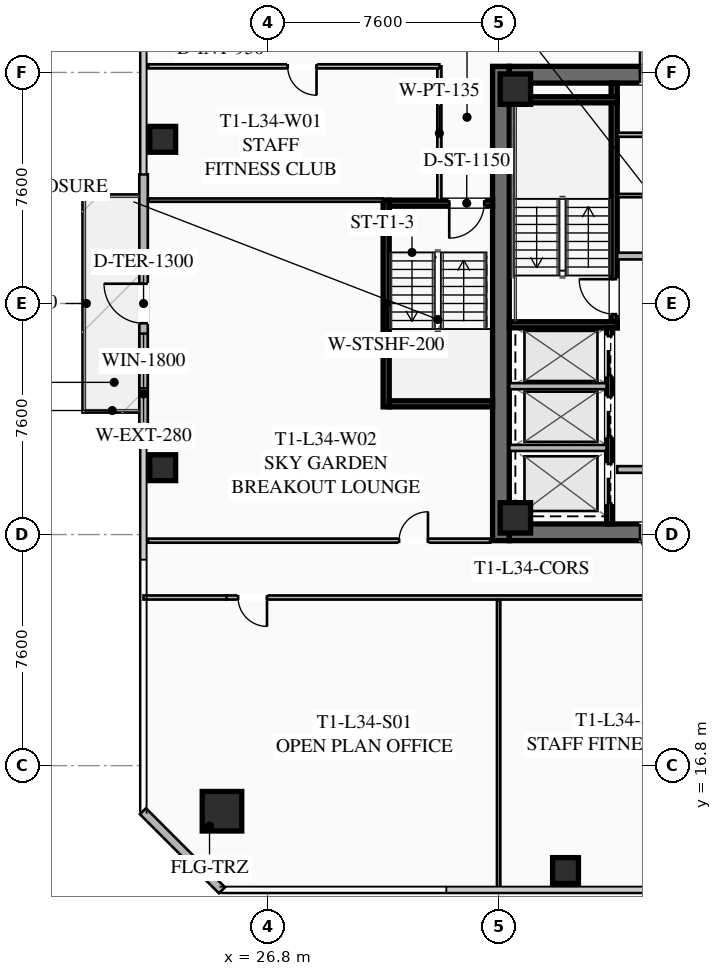
"""IFC4 building model, lengths in metres.
Left out: names, types, materials, properties, quantities, classifications, styles, units other than length and angle.
Written with IfcOpenShell. Run it as: python <this file> out.ifc"""

import sys

from ifc_helpers import new_model, si_unit, direction, frame, frame_2d, origin, origin_2d, place, context, subcontext, project, spatial, rectangle, hollow_rectangle, extrude, element, fill, save


model = new_model("IFC4")
c1 = context("Model", 3, precision=1e-05, world=origin(), true_north=direction((0.0, 1.0)))
c2 = subcontext(c1, "Body", "Model", "MODEL_VIEW")
j1 = project(units=[si_unit("LENGTHUNIT", "METRE"), si_unit("PLANEANGLEUNIT", "RADIAN")], contexts=[c1])
p1 = place(None, origin())
s1 = spatial("IfcSite", under=j1, at=p1, CompositionType="ELEMENT")
p2 = place(p1, origin())
s2 = spatial("IfcBuilding", under=s1, at=p2, CompositionType="ELEMENT")
p3 = place(p2, frame((0.0, 0.0, 128.6)))
s3 = spatial("IfcBuildingStorey", under=s2, at=p3, CompositionType="ELEMENT", Elevation=128.6)
p4 = place(p3, frame((34.475, 24.2, 0.0), z_axis=(0.0, 0.0, 1.0), x_axis=(0.0, 1.0, 0.0)))
e1 = element("IfcWall", 1, at=p4, inside=s3, PredefinedType="SHEAR", context=c2, shape_type="SweptSolid", body=[
    extrude(rectangle(XDim=15.6, YDim=0.55, at=frame_2d((7.8, 0.0))), origin(), (0.0, 0.0, 1.0), 3.55),
])
p5 = place(p3, frame((49.25, 24.475, 0.0), z_axis=(0.0, 0.0, 1.0), x_axis=(-1.0, 0.0, 0.0)))
e2 = element("IfcWall", 2, at=p5, inside=s3, PredefinedType="SHEAR", context=c2, shape_type="SweptSolid", body=[
    extrude(rectangle(XDim=14.5, YDim=0.55, at=frame_2d((7.25, 0.0))), origin(), (0.0, 0.0, 1.0), 3.55),
])
p6 = place(p5, frame((8.95, 0.0, 0.0)))
e3 = element("IfcOpeningElement", 3, at=p6, cuts=e2, PredefinedType="OPENING", context=c2, shape_type="SweptSolid", body=[
    extrude(rectangle(XDim=1.25, YDim=2.25, at=frame_2d((0.625, 1.125))), frame((0.0, 0.285, 0.0), z_axis=(0.0, -1.0, 0.0), x_axis=(1.0, 0.0, 0.0)), (0.0, 0.0, 1.0), 0.57),
])
p7 = place(p5, frame((3.9, 0.0, 0.0)))
e4 = element("IfcOpeningElement", 4, at=p7, cuts=e2, PredefinedType="OPENING", context=c2, shape_type="SweptSolid", body=[
    extrude(rectangle(XDim=1.25, YDim=2.25, at=frame_2d((0.625, 1.125))), frame((0.0, 0.285, 0.0), z_axis=(0.0, -1.0, 0.0), x_axis=(1.0, 0.0, 0.0)), (0.0, 0.0, 1.0), 0.57),
])
p8 = place(p3, frame((34.75, 39.525, 0.0), z_axis=(0.0, 0.0, 1.0), x_axis=(1.0, 0.0, 0.0)))
e5 = element("IfcWall", 5, at=p8, inside=s3, PredefinedType="SHEAR", context=c2, shape_type="SweptSolid", body=[
    extrude(rectangle(XDim=14.5, YDim=0.55, at=frame_2d((7.25, 0.0))), origin(), (0.0, 0.0, 1.0), 3.55),
])
p9 = place(p8, frame((4.3, 0.0, 0.0)))
e6 = element("IfcOpeningElement", 6, at=p9, cuts=e5, PredefinedType="OPENING", context=c2, shape_type="SweptSolid", body=[
    extrude(rectangle(XDim=1.25, YDim=2.25, at=frame_2d((0.625, 1.125))), frame((0.0, 0.285, 0.0), z_axis=(0.0, -1.0, 0.0), x_axis=(1.0, 0.0, 0.0)), (0.0, 0.0, 1.0), 0.57),
])
p10 = place(p8, frame((9.35, 0.0, 0.0)))
e7 = element("IfcOpeningElement", 7, at=p10, cuts=e5, PredefinedType="OPENING", context=c2, shape_type="SweptSolid", body=[
    extrude(rectangle(XDim=1.25, YDim=2.25, at=frame_2d((0.625, 1.125))), frame((0.0, 0.285, 0.0), z_axis=(0.0, -1.0, 0.0), x_axis=(1.0, 0.0, 0.0)), (0.0, 0.0, 1.0), 0.57),
])
for number, where, z_axis, x_axis in (
    (8, (34.95, 24.95, 0.0), (0.0, 0.0, 1.0), (1.0, 0.0, 0.0)),
    (9, (34.95, 39.05, 0.0), (0.0, 0.0, 1.0), (1.0, 0.0, 0.0)),
):
    element("IfcColumn", number, at=place(p3, frame(where, z_axis=z_axis, x_axis=x_axis)), inside=s3, PredefinedType="COLUMN", context=c2, shape_type="SweptSolid", body=[
        extrude(hollow_rectangle(XDim=1.0, YDim=1.0, WallThickness=0.04, at=origin_2d()), origin(), (0.0, 0.0, 1.0), 3.37),
    ])
p11 = place(p3, frame((25.3, 15.3, 0.0), z_axis=(0.0, 0.0, 1.0), x_axis=(1.0, 0.0, 0.0)))
e10 = element("IfcColumn", 10, at=p11, inside=s3, PredefinedType="COLUMN", context=c2, shape_type="SweptSolid", body=[
    extrude(hollow_rectangle(XDim=1.3, YDim=1.3, WallThickness=0.05, at=origin_2d()), origin(), (0.0, 0.0, 1.0), 3.37),
])
for number, where, z_axis, x_axis in (
    (11, (36.6, 13.35, 0.0), (0.0, 0.0, 1.0), (1.0, 0.0, 0.0)),
    (12, (23.35, 37.4, 0.0), (0.0, 0.0, 1.0), (1.0, 0.0, 0.0)),
    (13, (23.35, 26.6, 0.0), (0.0, 0.0, 1.0), (1.0, 0.0, 0.0)),
):
    element("IfcColumn", number, at=place(p3, frame(where, z_axis=z_axis, x_axis=x_axis)), inside=s3, PredefinedType="COLUMN", context=c2, shape_type="SweptSolid", body=[
        extrude(hollow_rectangle(XDim=0.85, YDim=0.85, WallThickness=0.035, at=origin_2d()), origin(), (0.0, 0.0, 1.0), 3.37),
    ])
p12 = place(p3, frame((22.72, 27.75, 0.0), z_axis=(0.0, 0.0, 1.0), x_axis=(0.0, 1.0, 0.0)))
e14 = element("IfcWall", 14, at=p12, inside=s3, PredefinedType="SOLIDWALL", context=c2, shape_type="SweptSolid", body=[
    extrude(rectangle(XDim=8.5, YDim=0.28, at=frame_2d((4.25, 0.0))), origin(), (0.0, 0.0, 1.0), 3.37),
])
p13 = place(p12, frame((3.6, 0.0, 0.0)))
e15 = element("IfcOpeningElement", 15, at=p13, cuts=e14, PredefinedType="OPENING", context=c2, shape_type="SweptSolid", body=[
    extrude(rectangle(XDim=1.3, YDim=2.15, at=frame_2d((0.65, 1.075))), frame((0.0, 0.15, 0.0), z_axis=(0.0, -1.0, 0.0), x_axis=(1.0, 0.0, 0.0)), (0.0, 0.0, 1.0), 0.3),
])
p14 = place(p12, frame((1.46, 0.0, 0.85)))
e16 = element("IfcOpeningElement", 16, at=p14, cuts=e14, PredefinedType="OPENING", context=c2, shape_type="SweptSolid", body=[
    extrude(rectangle(XDim=1.8, YDim=1.92, at=frame_2d((0.9, 0.96))), frame((0.0, 0.15, 0.0), z_axis=(0.0, -1.0, 0.0), x_axis=(1.0, 0.0, 0.0)), (0.0, 0.0, 1.0), 0.3),
])
p15 = place(p3, frame((25.3, 12.7, 0.0), z_axis=(0.0, 0.0, 1.0), x_axis=(-0.707106781187, 0.707106781187, 0.0)))
e17 = element("IfcWall", 17, at=p15, inside=s3, PredefinedType="SOLIDWALL", context=c2, shape_type="SweptSolid", body=[
    extrude(rectangle(XDim=3.677, YDim=0.28, at=frame_2d((1.838, 0.0))), origin(), (0.0, 0.0, 1.0), 3.37),
])
p16 = place(p3, frame((38.2, 31.2, 0.0), z_axis=(0.0, 0.0, 1.0), x_axis=(0.0, 1.0, 0.0)))
e18 = element("IfcWall", 18, at=p16, inside=s3, PredefinedType="SHEAR", context=c2, shape_type="SweptSolid", body=[
    extrude(rectangle(XDim=8.05, YDim=0.2, at=frame_2d((4.025, 0.0))), origin(), (0.0, 0.0, 1.0), 3.37),
])
p17 = place(p16, frame((0.45, 0.0, 0.0)))
e19 = element("IfcOpeningElement", 19, at=p17, cuts=e18, PredefinedType="OPENING", context=c2, shape_type="SweptSolid", body=[
    extrude(rectangle(XDim=1.15, YDim=2.2, at=frame_2d((0.575, 1.1))), frame((0.0, 0.11, 0.0), z_axis=(0.0, -1.0, 0.0), x_axis=(1.0, 0.0, 0.0)), (0.0, 0.0, 1.0), 0.22),
])
for number, where, z_axis, x_axis in (
    (20, (34.75, 31.3, 0.0), (0.0, 0.0, 1.0), (1.0, 0.0, 0.0)),
    (21, (34.75, 38.7, 0.0), (0.0, 0.0, 1.0), (1.0, 0.0, 0.0)),
):
    element("IfcWall", number, at=place(p3, frame(where, z_axis=z_axis, x_axis=x_axis)), inside=s3, PredefinedType="SHEAR", context=c2, shape_type="SweptSolid", body=[
        extrude(rectangle(XDim=3.55, YDim=0.2, at=frame_2d((1.775, 0.0))), origin(), (0.0, 0.0, 1.0), 3.37),
    ])
p18 = place(p3, frame((38.3, 33.56, 0.0), z_axis=(0.0, 0.0, 1.0), x_axis=(1.0, 0.0, 0.0)))
e22 = element("IfcWall", 22, at=p18, inside=s3, PredefinedType="SOLIDWALL", context=c2, shape_type="SweptSolid", body=[
    extrude(rectangle(XDim=3.15, YDim=0.22, at=frame_2d((1.575, 0.0))), origin(), (0.0, 0.0, 1.0), 2.723),
])
p19 = place(p18, frame((1.1, 0.0, 0.0)))
e23 = element("IfcOpeningElement", 23, at=p19, cuts=e22, PredefinedType="OPENING", context=c2, shape_type="SweptSolid", body=[
    extrude(rectangle(XDim=0.95, YDim=2.05, at=frame_2d((0.475, 1.025))), frame((0.0, 0.12, 0.0), z_axis=(0.0, -1.0, 0.0), x_axis=(1.0, 0.0, 0.0)), (0.0, 0.0, 1.0), 0.24),
])
p20 = place(p3, frame((38.3, 26.54, 0.0), z_axis=(0.0, 0.0, 1.0), x_axis=(1.0, 0.0, 0.0)))
e24 = element("IfcWall", 24, at=p20, inside=s3, PredefinedType="SOLIDWALL", context=c2, shape_type="SweptSolid", body=[
    extrude(rectangle(XDim=3.15, YDim=0.22, at=frame_2d((1.575, 0.0))), origin(), (0.0, 0.0, 1.0), 2.723),
])
p21 = place(p20, frame((0.95, 0.0, 0.0)))
e25 = element("IfcOpeningElement", 25, at=p21, cuts=e24, PredefinedType="OPENING", context=c2, shape_type="SweptSolid", body=[
    extrude(rectangle(XDim=1.25, YDim=2.25, at=frame_2d((0.625, 1.125))), frame((0.0, 0.12, 0.0), z_axis=(0.0, -1.0, 0.0), x_axis=(1.0, 0.0, 0.0)), (0.0, 0.0, 1.0), 0.24),
])
p22 = place(p3, frame((38.05, 24.75, 0.0), z_axis=(0.0, 0.0, 1.0), x_axis=(0.0, 1.0, 0.0)))
e26 = element("IfcWall", 26, at=p22, inside=s3, PredefinedType="SHEAR", context=c2, shape_type="SweptSolid", body=[
    extrude(rectangle(XDim=6.45, YDim=0.2, at=frame_2d((3.225, 0.0))), origin(), (0.0, 0.0, 1.0), 3.37),
])
p23 = place(p22, frame((4.875, 0.0, 0.0)))
e27 = element("IfcOpeningElement", 27, at=p23, cuts=e26, PredefinedType="OPENING", context=c2, shape_type="SweptSolid", body=[
    extrude(rectangle(XDim=1.3, YDim=2.25, at=frame_2d((0.65, 1.125))), frame((0.0, 0.11, 0.0), z_axis=(0.0, -1.0, 0.0), x_axis=(1.0, 0.0, 0.0)), (0.0, 0.0, 1.0), 0.22),
])
p24 = place(p22, frame((2.875, 0.0, 0.0)))
e28 = element("IfcOpeningElement", 28, at=p24, cuts=e26, PredefinedType="OPENING", context=c2, shape_type="SweptSolid", body=[
    extrude(rectangle(XDim=1.3, YDim=2.25, at=frame_2d((0.65, 1.125))), frame((0.0, 0.11, 0.0), z_axis=(0.0, -1.0, 0.0), x_axis=(1.0, 0.0, 0.0)), (0.0, 0.0, 1.0), 0.22),
])
p25 = place(p22, frame((0.675, 0.0, 0.0)))
e29 = element("IfcOpeningElement", 29, at=p25, cuts=e26, PredefinedType="OPENING", context=c2, shape_type="SweptSolid", body=[
    extrude(rectangle(XDim=1.3, YDim=2.25, at=frame_2d((0.65, 1.125))), frame((0.0, 0.11, 0.0), z_axis=(0.0, -1.0, 0.0), x_axis=(1.0, 0.0, 0.0)), (0.0, 0.0, 1.0), 0.22),
])
for number, where, z_axis, x_axis in (
    (30, (34.75, 27.25, 0.0), (0.0, 0.0, 1.0), (1.0, 0.0, 0.0)),
    (31, (34.75, 29.28, 0.0), (0.0, 0.0, 1.0), (1.0, 0.0, 0.0)),
):
    element("IfcWall", number, at=place(p3, frame(where, z_axis=z_axis, x_axis=x_axis)), inside=s3, PredefinedType="SOLIDWALL", context=c2, shape_type="SweptSolid", body=[
        extrude(rectangle(XDim=3.2, YDim=0.2, at=frame_2d((1.6, 0.0))), origin(), (0.0, 0.0, 1.0), 3.37),
    ])
p26 = place(p3, frame((38.3, 37.55, 0.0), z_axis=(0.0, 0.0, 1.0), x_axis=(1.0, 0.0, 0.0)))
e32 = element("IfcWall", 32, at=p26, inside=s3, PredefinedType="PARTITIONING", context=c2, shape_type="SweptSolid", body=[
    extrude(rectangle(XDim=3.15, YDim=0.135, at=frame_2d((1.575, 0.0))), origin(), (0.0, 0.0, 1.0), 2.723),
])
p27 = place(p26, frame((1.05, 0.0, 0.0)))
e33 = element("IfcOpeningElement", 33, at=p27, cuts=e32, PredefinedType="OPENING", context=c2, shape_type="SweptSolid", body=[
    extrude(rectangle(XDim=1.05, YDim=2.2, at=frame_2d((0.525, 1.1))), frame((0.0, 0.077, 0.0), z_axis=(0.0, -1.0, 0.0), x_axis=(1.0, 0.0, 0.0)), (0.0, 0.0, 1.0), 0.155),
])
p28 = place(p3, frame((38.3, 35.55, 0.0), z_axis=(0.0, 0.0, 1.0), x_axis=(1.0, 0.0, 0.0)))
e34 = element("IfcWall", 34, at=p28, inside=s3, PredefinedType="PARTITIONING", context=c2, shape_type="SweptSolid", body=[
    extrude(rectangle(XDim=3.15, YDim=0.11, at=frame_2d((1.575, 0.0))), origin(), (0.0, 0.0, 1.0), 2.723),
])
p29 = place(p3, frame((30.7, 28.6, 0.0), z_axis=(0.0, 0.0, 1.0), x_axis=(0.0, 1.0, 0.0)))
e35 = element("IfcWall", 35, at=p29, inside=s3, PredefinedType="SHEAR", context=c2, shape_type="SweptSolid", body=[
    extrude(rectangle(XDim=6.8, YDim=0.2, at=frame_2d((3.4, 0.0))), origin(), (0.0, 0.0, 1.0), 3.37),
])
p30 = place(p3, frame((34.2, 35.3, 0.0), z_axis=(0.0, 0.0, 1.0), x_axis=(-1.0, 0.0, 0.0)))
e36 = element("IfcWall", 36, at=p30, inside=s3, PredefinedType="SHEAR", context=c2, shape_type="SweptSolid", body=[
    extrude(rectangle(XDim=3.4, YDim=0.2, at=frame_2d((1.7, 0.0))), origin(), (0.0, 0.0, 1.0), 3.37),
])
p31 = place(p30, frame((0.275, 0.0, 0.0)))
e37 = element("IfcOpeningElement", 37, at=p31, cuts=e36, PredefinedType="OPENING", context=c2, shape_type="SweptSolid", body=[
    extrude(rectangle(XDim=1.15, YDim=2.2, at=frame_2d((0.575, 1.1))), frame((0.0, 0.11, 0.0), z_axis=(0.0, -1.0, 0.0), x_axis=(1.0, 0.0, 0.0)), (0.0, 0.0, 1.0), 0.22),
])
p32 = place(p3, frame((30.8, 28.7, 0.0), z_axis=(0.0, 0.0, 1.0), x_axis=(1.0, 0.0, 0.0)))
e38 = element("IfcWall", 38, at=p32, inside=s3, PredefinedType="SHEAR", context=c2, shape_type="SweptSolid", body=[
    extrude(rectangle(XDim=3.4, YDim=0.2, at=frame_2d((1.7, 0.0))), origin(), (0.0, 0.0, 1.0), 3.37),
])
p33 = place(p3, frame((32.45, 35.4, 0.0), z_axis=(0.0, 0.0, 1.0), x_axis=(0.0, 1.0, 0.0)))
e39 = element("IfcWall", 39, at=p33, inside=s3, PredefinedType="PARTITIONING", context=c2, shape_type="SweptSolid", body=[
    extrude(rectangle(XDim=4.4, YDim=0.135, at=frame_2d((2.2, 0.0))), origin(), (0.0, 0.0, 1.0), 2.723),
])
p34 = place(p3, frame((58.55, 22.33, 0.0), z_axis=(0.0, 0.0, 1.0), x_axis=(-1.0, 0.0, 0.0)))
e40 = element("IfcWall", 40, at=p34, inside=s3, PredefinedType="PARTITIONING", context=c2, shape_type="SweptSolid", body=[
    extrude(rectangle(XDim=33.1, YDim=0.135, at=frame_2d((16.55, 0.0))), origin(), (0.0, 0.0, 1.0), 2.723),
])
p35 = place(p34, frame((31.77, 0.0, 0.0)))
e41 = element("IfcOpeningElement", 41, at=p35, cuts=e40, PredefinedType="OPENING", context=c2, shape_type="SweptSolid", body=[
    extrude(rectangle(XDim=0.95, YDim=2.05, at=frame_2d((0.475, 1.025))), frame((0.0, 0.077, 0.0), z_axis=(0.0, -1.0, 0.0), x_axis=(1.0, 0.0, 0.0)), (0.0, 0.0, 1.0), 0.155),
])
p36 = place(p34, frame((16.33, 0.0, 0.0)))
e42 = element("IfcOpeningElement", 42, at=p36, cuts=e40, PredefinedType="OPENING", context=c2, shape_type="SweptSolid", body=[
    extrude(rectangle(XDim=0.95, YDim=2.05, at=frame_2d((0.475, 1.025))), frame((0.0, 0.077, 0.0), z_axis=(0.0, -1.0, 0.0), x_axis=(1.0, 0.0, 0.0)), (0.0, 0.0, 1.0), 0.155),
])
p37 = place(p34, frame((12.046, 0.0, 0.0)))
e43 = element("IfcOpeningElement", 43, at=p37, cuts=e40, PredefinedType="OPENING", context=c2, shape_type="SweptSolid", body=[
    extrude(rectangle(XDim=0.95, YDim=2.05, at=frame_2d((0.475, 1.025))), frame((0.0, 0.077, 0.0), z_axis=(0.0, -1.0, 0.0), x_axis=(1.0, 0.0, 0.0)), (0.0, 0.0, 1.0), 0.155),
])
p38 = place(p34, frame((0.38, 0.0, 0.0)))
e44 = element("IfcOpeningElement", 44, at=p38, cuts=e40, PredefinedType="OPENING", context=c2, shape_type="SweptSolid", body=[
    extrude(rectangle(XDim=0.95, YDim=2.05, at=frame_2d((0.475, 1.025))), frame((0.0, 0.077, 0.0), z_axis=(0.0, -1.0, 0.0), x_axis=(1.0, 0.0, 0.0)), (0.0, 0.0, 1.0), 0.155),
])
p39 = place(p3, frame((22.72, 22.33, 0.0), z_axis=(0.0, 0.0, 1.0), x_axis=(1.0, 0.0, 0.0)))
e45 = element("IfcWall", 45, at=p39, inside=s3, PredefinedType="PARTITIONING", context=c2, shape_type="SweptSolid", body=[
    extrude(rectangle(XDim=2.73, YDim=0.135, at=frame_2d((1.365, 0.0))), origin(), (0.0, 0.0, 1.0), 2.723),
])
p40 = place(p3, frame((34.4, 12.72, 0.0), z_axis=(0.0, 0.0, 1.0), x_axis=(0.0, 1.0, 0.0)))
e46 = element("IfcWall", 46, at=p40, inside=s3, PredefinedType="PARTITIONING", context=c2, shape_type="SweptSolid", body=[
    extrude(rectangle(XDim=9.53, YDim=0.11, at=frame_2d((4.765, 0.0))), origin(), (0.0, 0.0, 1.0), 2.723),
])
p41 = place(p3, frame((32.45, 39.8, 0.0), z_axis=(0.0, 0.0, 1.0), x_axis=(-1.0, 0.0, 0.0)))
e47 = element("IfcWall", 47, at=p41, inside=s3, PredefinedType="PARTITIONING", context=c2, shape_type="SweptSolid", body=[
    extrude(rectangle(XDim=9.58, YDim=0.135, at=frame_2d((4.79, 0.0))), origin(), (0.0, 0.0, 1.0), 2.723),
])
p42 = place(p41, frame((4.04, 0.0, 0.0)))
e48 = element("IfcOpeningElement", 48, at=p42, cuts=e47, PredefinedType="OPENING", context=c2, shape_type="SweptSolid", body=[
    extrude(rectangle(XDim=0.95, YDim=2.05, at=frame_2d((0.475, 1.025))), frame((0.0, 0.077, 0.0), z_axis=(0.0, -1.0, 0.0), x_axis=(1.0, 0.0, 0.0)), (0.0, 0.0, 1.0), 0.155),
])
p43 = place(p3, frame((22.87, 24.2, 0.0), z_axis=(0.0, 0.0, 1.0), x_axis=(1.0, 0.0, 0.0)))
e49 = element("IfcWall", 49, at=p43, inside=s3, PredefinedType="PARTITIONING", context=c2, shape_type="SweptSolid", body=[
    extrude(rectangle(XDim=11.25, YDim=0.135, at=frame_2d((5.625, 0.0))), origin(), (0.0, 0.0, 1.0), 2.723),
])
p44 = place(p43, frame((8.255, 0.0, 0.0)))
e50 = element("IfcOpeningElement", 50, at=p44, cuts=e49, PredefinedType="OPENING", context=c2, shape_type="SweptSolid", body=[
    extrude(rectangle(XDim=0.95, YDim=2.05, at=frame_2d((0.475, 1.025))), frame((0.0, 0.077, 0.0), z_axis=(0.0, -1.0, 0.0), x_axis=(1.0, 0.0, 0.0)), (0.0, 0.0, 1.0), 0.155),
])
p45 = place(p3, frame((30.6, 35.4, 0.0), z_axis=(0.0, 0.0, 1.0), x_axis=(-1.0, 0.0, 0.0)))
e51 = element("IfcWall", 51, at=p45, inside=s3, PredefinedType="PARTITIONING", context=c2, shape_type="SweptSolid", body=[
    extrude(rectangle(XDim=7.73, YDim=0.11, at=frame_2d((3.865, 0.0))), origin(), (0.0, 0.0, 1.0), 2.723),
])
p46 = place(p13, origin())
e52 = element("IfcDoor", 52, at=p46, inside=s3, OperationType="SINGLE_SWING_RIGHT", PredefinedType="DOOR", context=c2, shape_type="SweptSolid", body=[
    extrude(rectangle(XDim=1.3, YDim=2.15, at=frame_2d((0.65, 1.075))), frame((0.0, 0.025, 0.0), z_axis=(0.0, -1.0, 0.0), x_axis=(1.0, 0.0, 0.0)), (0.0, 0.0, 1.0), 0.05),
])
fill(e15, e52)
p47 = place(p14, origin())
e53 = element("IfcWindow", 53, at=p47, inside=s3, PartitioningType="SINGLE_PANEL", PredefinedType="WINDOW", context=c2, shape_type="SweptSolid", body=[
    extrude(rectangle(XDim=1.8, YDim=1.92, at=frame_2d((0.9, 0.96))), frame((0.0, 0.03, 0.0), z_axis=(0.0, -1.0, 0.0), x_axis=(1.0, 0.0, 0.0)), (0.0, 0.0, 1.0), 0.06),
])
fill(e16, e53)
p48 = place(p9, origin())
e54 = element("IfcDoor", 54, at=p48, inside=s3, OperationType="SINGLE_SWING_LEFT", PredefinedType="DOOR", context=c2, shape_type="SweptSolid", body=[
    extrude(rectangle(XDim=1.25, YDim=2.25, at=frame_2d((0.625, 1.125))), frame((0.0, 0.025, 0.0), z_axis=(0.0, -1.0, 0.0), x_axis=(1.0, 0.0, 0.0)), (0.0, 0.0, 1.0), 0.05),
])
fill(e6, e54)
p49 = place(p6, origin())
e55 = element("IfcDoor", 55, at=p49, inside=s3, OperationType="SINGLE_SWING_LEFT", PredefinedType="DOOR", context=c2, shape_type="SweptSolid", body=[
    extrude(rectangle(XDim=1.25, YDim=2.25, at=frame_2d((0.625, 1.125))), frame((0.0, 0.025, 0.0), z_axis=(0.0, -1.0, 0.0), x_axis=(1.0, 0.0, 0.0)), (0.0, 0.0, 1.0), 0.05),
])
fill(e3, e55)
p50 = place(p17, origin())
e56 = element("IfcDoor", 56, at=p50, inside=s3, OperationType="SINGLE_SWING_RIGHT", PredefinedType="DOOR", context=c2, shape_type="SweptSolid", body=[
    extrude(rectangle(XDim=1.15, YDim=2.2, at=frame_2d((0.575, 1.1))), frame((0.0, 0.025, 0.0), z_axis=(0.0, -1.0, 0.0), x_axis=(1.0, 0.0, 0.0)), (0.0, 0.0, 1.0), 0.05),
])
fill(e19, e56)
p51 = place(p31, origin())
e57 = element("IfcDoor", 57, at=p51, inside=s3, OperationType="SINGLE_SWING_RIGHT", PredefinedType="DOOR", context=c2, shape_type="SweptSolid", body=[
    extrude(rectangle(XDim=1.15, YDim=2.2, at=frame_2d((0.575, 1.1))), frame((0.0, 0.025, 0.0), z_axis=(0.0, -1.0, 0.0), x_axis=(1.0, 0.0, 0.0)), (0.0, 0.0, 1.0), 0.05),
])
fill(e37, e57)
p52 = place(p35, origin())
e58 = element("IfcDoor", 58, at=p52, inside=s3, OperationType="SINGLE_SWING_LEFT", PredefinedType="DOOR", context=c2, shape_type="SweptSolid", body=[
    extrude(rectangle(XDim=0.95, YDim=2.05, at=frame_2d((0.475, 1.025))), frame((0.0, 0.025, 0.0), z_axis=(0.0, -1.0, 0.0), x_axis=(1.0, 0.0, 0.0)), (0.0, 0.0, 1.0), 0.05),
])
fill(e41, e58)
p53 = place(p42, origin())
e59 = element("IfcDoor", 59, at=p53, inside=s3, OperationType="SINGLE_SWING_LEFT", PredefinedType="DOOR", context=c2, shape_type="SweptSolid", body=[
    extrude(rectangle(XDim=0.95, YDim=2.05, at=frame_2d((0.475, 1.025))), frame((0.0, 0.025, 0.0), z_axis=(0.0, -1.0, 0.0), x_axis=(1.0, 0.0, 0.0)), (0.0, 0.0, 1.0), 0.05),
])
fill(e48, e59)
p54 = place(p44, origin())
e60 = element("IfcDoor", 60, at=p54, inside=s3, OperationType="SINGLE_SWING_RIGHT", PredefinedType="DOOR", context=c2, shape_type="SweptSolid", body=[
    extrude(rectangle(XDim=0.95, YDim=2.05, at=frame_2d((0.475, 1.025))), frame((0.0, 0.025, 0.0), z_axis=(0.0, -1.0, 0.0), x_axis=(1.0, 0.0, 0.0)), (0.0, 0.0, 1.0), 0.05),
])
fill(e50, e60)
p55 = place(p23, origin())
e61 = element("IfcDoor", 61, at=p55, inside=s3, OperationType="SLIDING_TO_LEFT", PredefinedType="DOOR", context=c2, shape_type="SweptSolid", body=[
    extrude(rectangle(XDim=1.3, YDim=2.25, at=frame_2d((0.65, 1.125))), frame((0.0, 0.025, 0.0), z_axis=(0.0, -1.0, 0.0), x_axis=(1.0, 0.0, 0.0)), (0.0, 0.0, 1.0), 0.05),
])
fill(e27, e61)
p56 = place(p24, origin())
e62 = element("IfcDoor", 62, at=p56, inside=s3, OperationType="SLIDING_TO_LEFT", PredefinedType="DOOR", context=c2, shape_type="SweptSolid", body=[
    extrude(rectangle(XDim=1.3, YDim=2.25, at=frame_2d((0.65, 1.125))), frame((0.0, 0.025, 0.0), z_axis=(0.0, -1.0, 0.0), x_axis=(1.0, 0.0, 0.0)), (0.0, 0.0, 1.0), 0.05),
])
fill(e28, e62)
p57 = place(p25, origin())
e63 = element("IfcDoor", 63, at=p57, inside=s3, OperationType="SLIDING_TO_LEFT", PredefinedType="DOOR", context=c2, shape_type="SweptSolid", body=[
    extrude(rectangle(XDim=1.3, YDim=2.25, at=frame_2d((0.65, 1.125))), frame((0.0, 0.025, 0.0), z_axis=(0.0, -1.0, 0.0), x_axis=(1.0, 0.0, 0.0)), (0.0, 0.0, 1.0), 0.05),
])
fill(e29, e63)
save(model, sys.argv[1])
